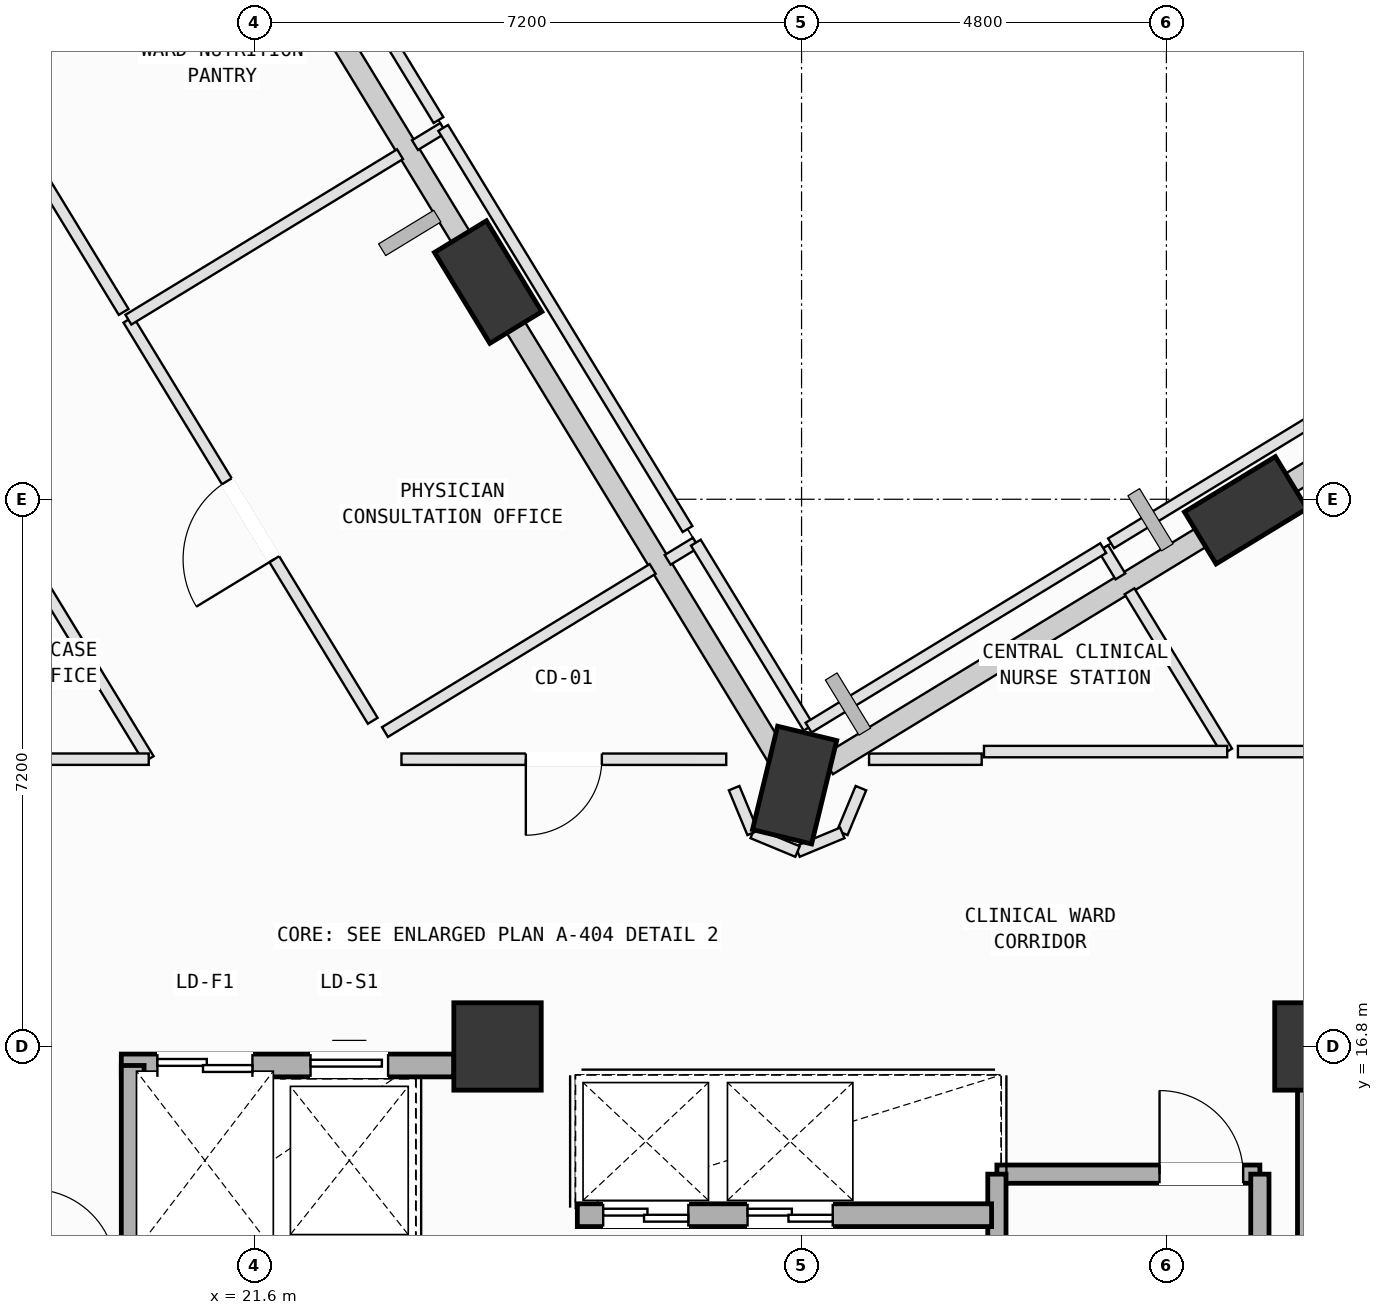
"""IFC4 building model, lengths in metres.
Left out: names, types, materials, properties, quantities, classifications, styles, units other than length and angle.
Written with IfcOpenShell. Run it as: python <this file> out.ifc"""

import sys

from ifc_helpers import new_model, si_unit, direction, frame, frame_2d, origin, origin_2d, place, context, subcontext, project, spatial, rectangle, extrude, element, fill, save


model = new_model("IFC4")
c1 = context("Model", 3, precision=1e-05, world=origin(), true_north=direction((0.0, 1.0)))
c2 = subcontext(c1, "Body", "Model", "MODEL_VIEW")
j1 = project(units=[si_unit("LENGTHUNIT", "METRE"), si_unit("PLANEANGLEUNIT", "RADIAN")], contexts=[c1])
p1 = place(None, origin())
s1 = spatial("IfcSite", under=j1, at=p1, CompositionType="ELEMENT")
p2 = place(p1, origin())
s2 = spatial("IfcBuilding", under=s1, at=p2, CompositionType="ELEMENT")
p3 = place(p2, frame((0.0, 0.0, 157.8)))
s3 = spatial("IfcBuildingStorey", under=s2, at=p3, CompositionType="ELEMENT", Elevation=157.8)
for number, where, z_axis, x_axis in (
    (1, (24.8, 16.8, 0.0), (0.0, 0.0, 1.0), (1.0, 0.0, 0.0)),
    (2, (35.6, 16.8, 0.0), (0.0, 0.0, 1.0), (1.0, 0.0, 0.0)),
):
    element("IfcColumn", number, at=place(p3, frame(where, z_axis=z_axis, x_axis=x_axis)), inside=s3, PredefinedType="COLUMN", context=c2, shape_type="SweptSolid", body=[
        extrude(rectangle(XDim=1.15, YDim=1.15, at=origin_2d()), origin(), (0.0, 0.0, 1.0), 4.0),
    ])
p4 = place(p3, frame((34.644, 23.855, 0.002), z_axis=(0.003848673761, 0.004337394239, 0.999983187219), x_axis=(-0.984086368833, 0.177665182712, 0.003016874168)))
e3 = element("IfcColumn", 3, at=p4, inside=s3, PredefinedType="COLUMN", context=c2, shape_type="SweptSolid", body=[
    extrude(rectangle(XDim=1.4, YDim=0.8, at=origin_2d()), origin(), (0.0, 0.0, 1.0), 3.996),
])
p5 = place(p3, frame((28.709, 20.239, 0.002), z_axis=(0.019053111064, -0.020091261347, 0.999616586585), x_axis=(-0.497184157498, 0.867227727399, 0.026906920365)))
e4 = element("IfcColumn", 4, at=p5, inside=s3, PredefinedType="COLUMN", context=c2, shape_type="SweptSolid", body=[
    extrude(rectangle(XDim=1.4, YDim=0.8, at=origin_2d()), origin(), (0.0, 0.0, 1.0), 3.998),
])
p6 = place(p3, frame((24.677, 26.858, 0.002), z_axis=(-0.008180309304, -0.037055580205, 0.999279723859), x_axis=(-0.324069376785, 0.945478073215, 0.032407593253)))
e5 = element("IfcColumn", 5, at=p6, inside=s3, PredefinedType="COLUMN", context=c2, shape_type="SweptSolid", body=[
    extrude(rectangle(XDim=1.4, YDim=0.8, at=origin_2d()), origin(), (0.0, 0.0, 1.0), 3.999),
])
p7 = place(p3, frame((35.077, 24.119, 0.0), z_axis=(0.0, 0.0, 1.0), x_axis=(0.853983619902, 0.52029989135, 0.0)))
e6 = element("IfcWall", 6, at=p7, inside=s3, PredefinedType="SOLIDWALL", context=c2, shape_type="SweptSolid", body=[
    extrude(rectangle(XDim=2.019, YDim=0.28, at=frame_2d((1.009, 0.0))), origin(), (0.0, 0.0, 1.0), 3.145),
])
p8 = place(p3, frame((29.14, 20.502, 0.0), z_axis=(0.0, 0.0, 1.0), x_axis=(0.853999949141, 0.52027308874, 0.0)))
e7 = element("IfcWall", 7, at=p8, inside=s3, PredefinedType="SOLIDWALL", context=c2, shape_type="SweptSolid", body=[
    extrude(rectangle(XDim=5.96, YDim=0.28, at=frame_2d((2.98, 0.0))), origin(), (0.0, 0.0, 1.0), 3.165),
])
p9 = place(p3, frame((28.479, 20.617, 0.0), z_axis=(0.0, 0.0, 1.0), x_axis=(-0.520241368048, 0.854019273185, 0.0)))
e8 = element("IfcWall", 8, at=p9, inside=s3, PredefinedType="SOLIDWALL", context=c2, shape_type="SweptSolid", body=[
    extrude(rectangle(XDim=6.76, YDim=0.28, at=frame_2d((3.38, 0.0))), origin(), (0.0, 0.0, 1.0), 3.165),
])
p10 = place(p3, frame((24.448, 27.232, 0.0), z_axis=(0.0, 0.0, 1.0), x_axis=(-0.520230695159, 0.854025774678, 0.0)))
e9 = element("IfcWall", 9, at=p10, inside=s3, PredefinedType="SOLIDWALL", context=c2, shape_type="SweptSolid", body=[
    extrude(rectangle(XDim=6.223, YDim=0.28, at=frame_2d((3.111, 0.0))), origin(), (0.0, 0.0, 1.0), 3.165),
])
p11 = place(p10, frame((3.374, 0.0, 0.75)))
e10 = element("IfcOpeningElement", 10, at=p11, cuts=e9, PredefinedType="OPENING", context=c2, shape_type="SweptSolid", body=[
    extrude(rectangle(XDim=1.4, YDim=1.85, at=frame_2d((0.7, 0.925))), frame((0.0, 0.15, 0.0), z_axis=(0.0, -1.0, 0.0), x_axis=(1.0, 0.0, 0.0)), (0.0, 0.0, 1.0), 0.3),
])
p12 = place(p3, frame((31.37, 15.12, 0.0), z_axis=(0.0, 0.0, 1.0), x_axis=(1.0, 0.0, 0.0)))
e11 = element("IfcWall", 11, at=p12, inside=s3, PredefinedType="SOLIDWALL", context=c2, shape_type="SweptSolid", body=[
    extrude(rectangle(XDim=3.46, YDim=0.24, at=frame_2d((1.73, 0.0))), origin(), (0.0, 0.0, 1.0), 3.78),
])
p13 = place(p12, frame((2.14, 0.0, 0.0)))
e12 = element("IfcOpeningElement", 12, at=p13, cuts=e11, PredefinedType="OPENING", context=c2, shape_type="SweptSolid", body=[
    extrude(rectangle(XDim=1.1, YDim=2.15, at=frame_2d((0.55, 1.075))), frame((0.0, 0.13, 0.0), z_axis=(0.0, -1.0, 0.0), x_axis=(1.0, 0.0, 0.0)), (0.0, 0.0, 1.0), 0.26),
])
for number, where, z_axis, x_axis in (
    (13, (34.83, 15.12, 0.0), (0.0, 0.0, 1.0), (0.0, -1.0, 0.0)),
    (14, (31.37, 8.075, 0.0), (0.0, 0.0, 1.0), (0.0, 1.0, 0.0)),
):
    element("IfcWall", number, at=place(p3, frame(where, z_axis=z_axis, x_axis=x_axis)), inside=s3, PredefinedType="SOLIDWALL", context=c2, shape_type="SweptSolid", body=[
        extrude(rectangle(XDim=7.045, YDim=0.24, at=frame_2d((3.522, 0.0))), origin(), (0.0, 0.0, 1.0), 3.78),
    ])
p14 = place(p3, frame((35.6, 7.8, 0.0), z_axis=(0.0, 0.0, 1.0), x_axis=(0.0, 1.0, 0.0)))
e15 = element("IfcWall", 15, at=p14, inside=s3, PredefinedType="SHEAR", context=c2, shape_type="SweptSolid", body=[
    extrude(rectangle(XDim=9.0, YDim=0.55, at=frame_2d((4.5, 0.0))), origin(), (0.0, 0.0, 1.0), 3.78),
])
p15 = place(p3, frame((19.85, 16.55, 0.0), z_axis=(0.0, 0.0, 1.0), x_axis=(1.0, 0.0, 0.0)))
e16 = element("IfcWall", 16, at=p15, inside=s3, PredefinedType="SOLIDWALL", context=c2, shape_type="SweptSolid", body=[
    extrude(rectangle(XDim=4.375, YDim=0.3, at=frame_2d((2.188, 0.0))), origin(), (0.0, 0.0, 1.0), 3.78),
])
p16 = place(p15, frame((0.475, 0.0, 0.0)))
e17 = element("IfcOpeningElement", 17, at=p16, cuts=e16, PredefinedType="OPENING", context=c2, shape_type="SweptSolid", body=[
    extrude(rectangle(XDim=1.25, YDim=2.18, at=frame_2d((0.625, 1.09))), frame((0.0, 0.16, 0.0), z_axis=(0.0, -1.0, 0.0), x_axis=(1.0, 0.0, 0.0)), (0.0, 0.0, 1.0), 0.32),
])
p17 = place(p15, frame((2.49, 0.0, 0.0)))
e18 = element("IfcOpeningElement", 18, at=p17, cuts=e16, PredefinedType="OPENING", context=c2, shape_type="SweptSolid", body=[
    extrude(rectangle(XDim=1.02, YDim=2.12, at=frame_2d((0.51, 1.06))), frame((0.0, 0.16, 0.0), z_axis=(0.0, -1.0, 0.0), x_axis=(1.0, 0.0, 0.0)), (0.0, 0.0, 1.0), 0.32),
])
p18 = place(p3, frame((20.0, 13.82, 0.0), z_axis=(0.0, 0.0, 1.0), x_axis=(0.0, 1.0, 0.0)))
e19 = element("IfcWall", 19, at=p18, inside=s3, PredefinedType="SOLIDWALL", context=c2, shape_type="SweptSolid", body=[
    extrude(rectangle(XDim=2.73, YDim=0.3, at=frame_2d((1.365, 0.0))), origin(), (0.0, 0.0, 1.0), 3.78),
])
p19 = place(p3, frame((25.85, 14.58, 0.0), z_axis=(0.0, 0.0, 1.0), x_axis=(1.0, 0.0, 0.0)))
e20 = element("IfcWall", 20, at=p19, inside=s3, PredefinedType="SOLIDWALL", context=c2, shape_type="SweptSolid", body=[
    extrude(rectangle(XDim=5.45, YDim=0.3, at=frame_2d((2.725, 0.0))), origin(), (0.0, 0.0, 1.0), 3.78),
])
p20 = place(p19, frame((0.34, 0.0, 0.0)))
e21 = element("IfcOpeningElement", 21, at=p20, cuts=e20, PredefinedType="OPENING", context=c2, shape_type="SweptSolid", body=[
    extrude(rectangle(XDim=1.12, YDim=2.15, at=frame_2d((0.56, 1.075))), frame((0.0, 0.16, 0.0), z_axis=(0.0, -1.0, 0.0), x_axis=(1.0, 0.0, 0.0)), (0.0, 0.0, 1.0), 0.32),
])
p21 = place(p19, frame((2.24, 0.0, 0.0)))
e22 = element("IfcOpeningElement", 22, at=p21, cuts=e20, PredefinedType="OPENING", context=c2, shape_type="SweptSolid", body=[
    extrude(rectangle(XDim=1.12, YDim=2.15, at=frame_2d((0.56, 1.075))), frame((0.0, 0.16, 0.0), z_axis=(0.0, -1.0, 0.0), x_axis=(1.0, 0.0, 0.0)), (0.0, 0.0, 1.0), 0.32),
])
p22 = place(p3, frame((32.769, 23.357, 0.0), z_axis=(0.0, 0.0, 1.0), x_axis=(0.519519720365, -0.854458460168, 0.0)))
e23 = element("IfcWall", 23, at=p22, inside=s3, PredefinedType="PARTITIONING", context=c2, shape_type="SweptSolid", body=[
    extrude(rectangle(XDim=0.435, YDim=0.15, at=frame_2d((0.218, 0.0))), origin(), (0.0, 0.0, 1.0), 3.78),
])
p23 = place(p3, frame((33.115, 22.789, 0.0), z_axis=(0.0, 0.0, 1.0), x_axis=(0.520269924508, -0.854001876843, 0.0)))
e24 = element("IfcWall", 24, at=p23, inside=s3, PredefinedType="PARTITIONING", context=c2, shape_type="SweptSolid", body=[
    extrude(rectangle(XDim=2.47, YDim=0.15, at=frame_2d((1.235, 0.0))), origin(), (0.0, 0.0, 1.0), 3.78),
])
p24 = place(p3, frame((34.4, 20.68, 0.0), z_axis=(0.0, 0.0, 1.0), x_axis=(-1.0, 0.0, 0.0)))
e25 = element("IfcWall", 25, at=p24, inside=s3, PredefinedType="PARTITIONING", context=c2, shape_type="SweptSolid", body=[
    extrude(rectangle(XDim=3.2, YDim=0.15, at=frame_2d((1.6, 0.0))), origin(), (0.0, 0.0, 1.0), 3.78),
])
p25 = place(p3, frame((31.17, 20.58, 0.0), z_axis=(0.0, 0.0, 1.0), x_axis=(-0.999999782874, -0.00065897844, 0.0)))
e26 = element("IfcWall", 26, at=p25, inside=s3, PredefinedType="PARTITIONING", context=c2, shape_type="SweptSolid", body=[
    extrude(rectangle(XDim=1.482, YDim=0.15, at=frame_2d((0.741, 0.0))), origin(), (0.0, 0.0, 1.0), 3.78),
])
for number, where, z_axis, x_axis in (
    (27, (29.581, 20.199, 0.0), (0.0, 0.0, 1.0), (-0.384, -0.923, 0.0)),
    (28, (29.336, 19.61, 0.0), (0.0, 0.0, 1.0), (-0.923, -0.384, 0.0)),
):
    element("IfcWall", number, at=place(p3, frame(where, z_axis=z_axis, x_axis=x_axis)), inside=s3, PredefinedType="PARTITIONING", context=c2, shape_type="SweptSolid", body=[
        extrude(rectangle(XDim=0.638, YDim=0.15, at=frame_2d((0.319, 0.0))), origin(), (0.0, 0.0, 1.0), 3.78),
    ])
p26 = place(p3, frame((28.747, 19.365, 0.0), z_axis=(0.0, 0.0, 1.0), x_axis=(-0.923494633817, 0.383611341478, 0.0)))
e29 = element("IfcWall", 29, at=p26, inside=s3, PredefinedType="PARTITIONING", context=c2, shape_type="SweptSolid", body=[
    extrude(rectangle(XDim=0.639, YDim=0.15, at=frame_2d((0.319, 0.0))), origin(), (0.0, 0.0, 1.0), 3.78),
])
p27 = place(p3, frame((28.157, 19.61, 0.0), z_axis=(0.0, 0.0, 1.0), x_axis=(-0.382656259044, 0.923890787601, 0.0)))
e30 = element("IfcWall", 30, at=p27, inside=s3, PredefinedType="PARTITIONING", context=c2, shape_type="SweptSolid", body=[
    extrude(rectangle(XDim=0.637, YDim=0.15, at=frame_2d((0.319, 0.0))), origin(), (0.0, 0.0, 1.0), 3.78),
])
p28 = place(p3, frame((27.809, 20.579, 0.0), z_axis=(0.0, 0.0, 1.0), x_axis=(-0.999999973887, 0.000228532246, 0.0)))
e31 = element("IfcWall", 31, at=p28, inside=s3, PredefinedType="PARTITIONING", context=c2, shape_type="SweptSolid", body=[
    extrude(rectangle(XDim=4.273, YDim=0.15, at=frame_2d((2.137, 0.0))), origin(), (0.0, 0.0, 1.0), 3.78),
])
p29 = place(p28, frame((1.636, 0.0, 0.0)))
e32 = element("IfcOpeningElement", 32, at=p29, cuts=e31, PredefinedType="OPENING", context=c2, shape_type="SweptSolid", body=[
    extrude(rectangle(XDim=1.0, YDim=2.12, at=frame_2d((0.5, 1.06))), frame((0.0, 0.085, 0.0), z_axis=(0.0, -1.0, 0.0), x_axis=(1.0, 0.0, 0.0)), (0.0, 0.0, 1.0), 0.17),
])
p30 = place(p3, frame((23.319, 20.937, 0.0), z_axis=(0.0, 0.0, 1.0), x_axis=(0.853962989995, 0.520333750316, 0.0)))
e33 = element("IfcWall", 33, at=p30, inside=s3, PredefinedType="PARTITIONING", context=c2, shape_type="SweptSolid", body=[
    extrude(rectangle(XDim=4.124, YDim=0.15, at=frame_2d((2.062, 0.0))), origin(), (0.0, 0.0, 1.0), 3.78),
])
p31 = place(p3, frame((27.038, 23.203, 0.0), z_axis=(0.0, 0.0, 1.0), x_axis=(0.853851017382, 0.520517473401, 0.0)))
e34 = element("IfcWall", 34, at=p31, inside=s3, PredefinedType="PARTITIONING", context=c2, shape_type="SweptSolid", body=[
    extrude(rectangle(XDim=0.434, YDim=0.15, at=frame_2d((0.217, 0.0))), origin(), (0.0, 0.0, 1.0), 3.78),
])
p32 = place(p3, frame((27.409, 23.429, 0.0), z_axis=(0.0, 0.0, 1.0), x_axis=(0.520378956631, -0.8539354434, 0.0)))
e35 = element("IfcWall", 35, at=p32, inside=s3, PredefinedType="PARTITIONING", context=c2, shape_type="SweptSolid", body=[
    extrude(rectangle(XDim=2.85, YDim=0.15, at=frame_2d((1.425, 0.0))), origin(), (0.0, 0.0, 1.0), 3.78),
])
p33 = place(p3, frame((28.892, 20.995, 0.0), z_axis=(0.0, 0.0, 1.0), x_axis=(0.854009494037, 0.52025742099, 0.0)))
e36 = element("IfcWall", 36, at=p33, inside=s3, PredefinedType="PARTITIONING", context=c2, shape_type="SweptSolid", body=[
    extrude(rectangle(XDim=4.54, YDim=0.15, at=frame_2d((2.27, 0.0))), origin(), (0.0, 0.0, 1.0), 3.78),
])
p34 = place(p3, frame((41.041, 20.68, 0.0), z_axis=(0.0, 0.0, 1.0), x_axis=(-1.0, 0.0, 0.0)))
e37 = element("IfcWall", 37, at=p34, inside=s3, PredefinedType="PARTITIONING", context=c2, shape_type="SweptSolid", body=[
    extrude(rectangle(XDim=6.5, YDim=0.15, at=frame_2d((3.25, 0.0))), origin(), (0.0, 0.0, 1.0), 3.415),
])
p35 = place(p34, frame((2.65, 0.0, 0.0)))
e38 = element("IfcOpeningElement", 38, at=p35, cuts=e37, PredefinedType="OPENING", context=c2, shape_type="SweptSolid", body=[
    extrude(rectangle(XDim=1.2, YDim=2.15, at=frame_2d((0.6, 1.075))), frame((0.0, 0.085, 0.0), z_axis=(0.0, -1.0, 0.0), x_axis=(1.0, 0.0, 0.0)), (0.0, 0.0, 1.0), 0.17),
])
p36 = place(p3, frame((32.872, 23.42, 0.0), z_axis=(0.0, 0.0, 1.0), x_axis=(0.854016662938, 0.52024565296, 0.0)))
e39 = element("IfcWall", 39, at=p36, inside=s3, PredefinedType="PARTITIONING", context=c2, shape_type="SweptSolid", body=[
    extrude(rectangle(XDim=4.2, YDim=0.15, at=frame_2d((2.1, 0.0))), origin(), (0.0, 0.0, 1.0), 3.78),
])
p37 = place(p3, frame((23.158, 21.085, 0.0), z_axis=(0.0, 0.0, 1.0), x_axis=(-0.520195067616, 0.854047476214, 0.0)))
e40 = element("IfcWall", 40, at=p37, inside=s3, PredefinedType="PARTITIONING", context=c2, shape_type="SweptSolid", body=[
    extrude(rectangle(XDim=6.18, YDim=0.15, at=frame_2d((3.09, 0.0))), origin(), (0.0, 0.0, 1.0), 3.78),
])
p38 = place(p37, frame((2.49, 0.0, 0.0)))
e41 = element("IfcOpeningElement", 41, at=p38, cuts=e40, PredefinedType="OPENING", context=c2, shape_type="SweptSolid", body=[
    extrude(rectangle(XDim=1.2, YDim=2.15, at=frame_2d((0.6, 1.075))), frame((0.0, 0.085, 0.0), z_axis=(0.0, -1.0, 0.0), x_axis=(1.0, 0.0, 0.0)), (0.0, 0.0, 1.0), 0.17),
])
p39 = place(p3, frame((19.943, 26.363, 0.0), z_axis=(0.0, 0.0, 1.0), x_axis=(0.854035162243, 0.520215283948, 0.0)))
e42 = element("IfcWall", 42, at=p39, inside=s3, PredefinedType="PARTITIONING", context=c2, shape_type="SweptSolid", body=[
    extrude(rectangle(XDim=4.185, YDim=0.15, at=frame_2d((2.092, 0.0))), origin(), (0.0, 0.0, 1.0), 3.78),
])
p40 = place(p3, frame((23.714, 28.66, 0.0), z_axis=(0.0, 0.0, 1.0), x_axis=(0.853851017382, 0.520517473401, 0.0)))
e43 = element("IfcWall", 43, at=p40, inside=s3, PredefinedType="PARTITIONING", context=c2, shape_type="SweptSolid", body=[
    extrude(rectangle(XDim=0.434, YDim=0.15, at=frame_2d((0.217, 0.0))), origin(), (0.0, 0.0, 1.0), 3.78),
])
p41 = place(p3, frame((24.085, 28.886, 0.0), z_axis=(0.0, 0.0, 1.0), x_axis=(0.520223881185, -0.85402992538, 0.0)))
e44 = element("IfcWall", 44, at=p41, inside=s3, PredefinedType="PARTITIONING", context=c2, shape_type="SweptSolid", body=[
    extrude(rectangle(XDim=6.18, YDim=0.15, at=frame_2d((3.09, 0.0))), origin(), (0.0, 0.0, 1.0), 3.78),
])
p42 = place(p3, frame((19.881, 26.465, 0.0), z_axis=(0.0, 0.0, 1.0), x_axis=(-0.520269153485, 0.854002346561, 0.0)))
e45 = element("IfcWall", 45, at=p42, inside=s3, PredefinedType="PARTITIONING", context=c2, shape_type="SweptSolid", body=[
    extrude(rectangle(XDim=5.48, YDim=0.15, at=frame_2d((2.74, 0.0))), origin(), (0.0, 0.0, 1.0), 3.78),
])
p43 = place(p42, frame((2.28, 0.0, 0.0)))
e46 = element("IfcOpeningElement", 46, at=p43, cuts=e45, PredefinedType="OPENING", context=c2, shape_type="SweptSolid", body=[
    extrude(rectangle(XDim=0.92, YDim=2.1, at=frame_2d((0.46, 1.05))), frame((0.0, 0.085, 0.0), z_axis=(0.0, -1.0, 0.0), x_axis=(1.0, 0.0, 0.0)), (0.0, 0.0, 1.0), 0.17),
])
p44 = place(p3, frame((21.171, 33.669, 0.0), z_axis=(0.0, 0.0, 1.0), x_axis=(0.520399103796, -0.853923165611, 0.0)))
e47 = element("IfcWall", 47, at=p44, inside=s3, PredefinedType="PARTITIONING", context=c2, shape_type="SweptSolid", body=[
    extrude(rectangle(XDim=5.48, YDim=0.15, at=frame_2d((2.74, 0.0))), origin(), (0.0, 0.0, 1.0), 3.78),
])
p45 = place(p3, frame((18.794, 22.906, 0.0), z_axis=(0.0, 0.0, 1.0), x_axis=(0.520271097481, -0.854001162251, 0.0)))
e48 = element("IfcWall", 48, at=p45, inside=s3, PredefinedType="PARTITIONING", context=c2, shape_type="SweptSolid", body=[
    extrude(rectangle(XDim=2.724, YDim=0.15, at=frame_2d((1.362, 0.0))), origin(), (0.0, 0.0, 1.0), 3.78),
])
p46 = place(p3, frame((20.211, 20.58, 0.0), z_axis=(0.0, 0.0, 1.0), x_axis=(-1.0, 0.0, 0.0)))
e49 = element("IfcWall", 49, at=p46, inside=s3, PredefinedType="PARTITIONING", context=c2, shape_type="SweptSolid", body=[
    extrude(rectangle(XDim=5.082, YDim=0.15, at=frame_2d((2.541, 0.0))), origin(), (0.0, 0.0, 1.0), 3.78),
])
p47 = place(p46, frame((2.041, 0.0, 0.0)))
e50 = element("IfcOpeningElement", 50, at=p47, cuts=e49, PredefinedType="OPENING", context=c2, shape_type="SweptSolid", body=[
    extrude(rectangle(XDim=1.0, YDim=2.12, at=frame_2d((0.5, 1.06))), frame((0.0, 0.085, 0.0), z_axis=(0.0, -1.0, 0.0), x_axis=(1.0, 0.0, 0.0)), (0.0, 0.0, 1.0), 0.17),
])
p48 = place(p13, origin())
e51 = element("IfcDoor", 51, at=p48, inside=s3, OperationType="SINGLE_SWING_LEFT", PredefinedType="DOOR", context=c2, shape_type="SweptSolid", body=[
    extrude(rectangle(XDim=1.1, YDim=2.15, at=frame_2d((0.55, 1.075))), frame((0.0, 0.025, 0.0), z_axis=(0.0, -1.0, 0.0), x_axis=(1.0, 0.0, 0.0)), (0.0, 0.0, 1.0), 0.05),
])
fill(e12, e51)
p49 = place(p20, origin())
e52 = element("IfcDoor", 52, at=p49, inside=s3, OperationType="DOUBLE_DOOR_SLIDING", PredefinedType="DOOR", context=c2, shape_type="SweptSolid", body=[
    extrude(rectangle(XDim=1.12, YDim=2.15, at=frame_2d((0.56, 1.075))), frame((0.0, 0.025, 0.0), z_axis=(0.0, -1.0, 0.0), x_axis=(1.0, 0.0, 0.0)), (0.0, 0.0, 1.0), 0.05),
])
fill(e21, e52)
p50 = place(p21, origin())
e53 = element("IfcDoor", 53, at=p50, inside=s3, OperationType="DOUBLE_DOOR_SLIDING", PredefinedType="DOOR", context=c2, shape_type="SweptSolid", body=[
    extrude(rectangle(XDim=1.12, YDim=2.15, at=frame_2d((0.56, 1.075))), frame((0.0, 0.025, 0.0), z_axis=(0.0, -1.0, 0.0), x_axis=(1.0, 0.0, 0.0)), (0.0, 0.0, 1.0), 0.05),
])
fill(e22, e53)
p51 = place(p16, origin())
e54 = element("IfcDoor", 54, at=p51, inside=s3, OperationType="DOUBLE_DOOR_SLIDING", PredefinedType="DOOR", context=c2, shape_type="SweptSolid", body=[
    extrude(rectangle(XDim=1.25, YDim=2.18, at=frame_2d((0.625, 1.09))), frame((0.0, 0.025, 0.0), z_axis=(0.0, -1.0, 0.0), x_axis=(1.0, 0.0, 0.0)), (0.0, 0.0, 1.0), 0.05),
])
fill(e17, e54)
p52 = place(p17, origin())
e55 = element("IfcDoor", 55, at=p52, inside=s3, OperationType="SLIDING_TO_LEFT", PredefinedType="DOOR", context=c2, shape_type="SweptSolid", body=[
    extrude(rectangle(XDim=1.02, YDim=2.12, at=frame_2d((0.51, 1.06))), frame((0.0, 0.025, 0.0), z_axis=(0.0, -1.0, 0.0), x_axis=(1.0, 0.0, 0.0)), (0.0, 0.0, 1.0), 0.05),
])
fill(e18, e55)
p53 = place(p29, origin())
e56 = element("IfcDoor", 56, at=p53, inside=s3, OperationType="SINGLE_SWING_RIGHT", PredefinedType="DOOR", context=c2, shape_type="SweptSolid", body=[
    extrude(rectangle(XDim=1.0, YDim=2.12, at=frame_2d((0.5, 1.06))), frame((0.0, 0.025, 0.0), z_axis=(0.0, -1.0, 0.0), x_axis=(1.0, 0.0, 0.0)), (0.0, 0.0, 1.0), 0.05),
])
fill(e32, e56)
p54 = place(p38, origin())
e57 = element("IfcDoor", 57, at=p54, inside=s3, OperationType="SINGLE_SWING_LEFT", PredefinedType="DOOR", context=c2, shape_type="SweptSolid", body=[
    extrude(rectangle(XDim=1.2, YDim=2.15, at=frame_2d((0.6, 1.075))), frame((0.0, 0.025, 0.0), z_axis=(0.0, -1.0, 0.0), x_axis=(1.0, 0.0, 0.0)), (0.0, 0.0, 1.0), 0.05),
])
fill(e41, e57)
save(model, sys.argv[1])
